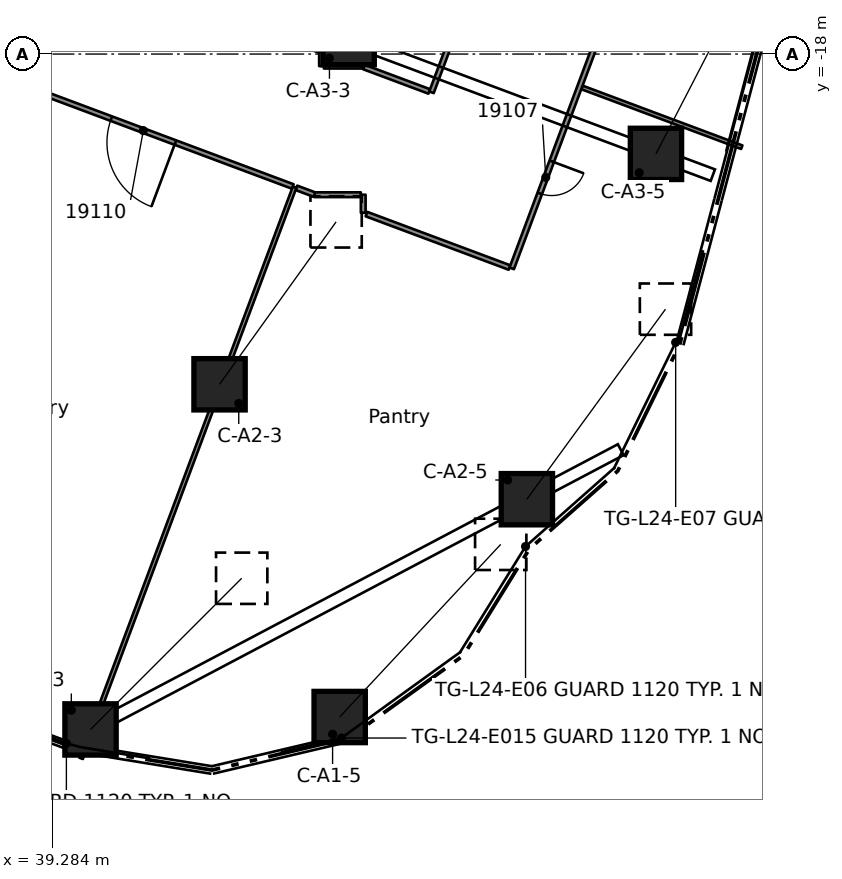
"""IFC4 building model, lengths in metres.
Left out: names, types, materials, properties, quantities, classifications, styles, units other than length and angle.
Written with IfcOpenShell. Run it as: python <this file> out.ifc"""

import sys

from ifc_helpers import new_model, si_unit, direction, frame, frame_2d, origin, origin_2d, place, context, subcontext, project, spatial, rectangle, extrude, element, fill, save


model = new_model("IFC4")
c1 = context("Model", 3, precision=1e-05, world=origin(), true_north=direction((0.0, 1.0)))
c2 = subcontext(c1, "Body", "Model", "MODEL_VIEW")
j1 = project(units=[si_unit("LENGTHUNIT", "METRE"), si_unit("PLANEANGLEUNIT", "RADIAN")], contexts=[c1])
p1 = place(None, origin())
s1 = spatial("IfcSite", under=j1, at=p1, CompositionType="ELEMENT")
p2 = place(p1, origin())
s2 = spatial("IfcBuilding", under=s1, at=p2, CompositionType="ELEMENT")
p3 = place(p2, frame((0.0, 0.0, 98.2)))
s3 = spatial("IfcBuildingStorey", under=s2, at=p3, CompositionType="ELEMENT", Elevation=98.2)
p4 = place(p3, frame((40.291, -35.771, 0.605), z_axis=(0.633459537703, 0.633459537703, 0.444362496376), x_axis=(-0.707106781187, 0.707106781187, 0.0)))
e1 = element("IfcColumn", 1, at=p4, inside=s3, PredefinedType="COLUMN", context=c2, shape_type="SweptSolid", body=[
    extrude(rectangle(XDim=1.35, YDim=1.35, at=origin_2d()), origin(), (0.0, 0.0, 1.0), 6.28),
])
p5 = place(p3, frame((46.847, -35.444, 0.617), z_axis=(0.623125024098, 0.667995482081, 0.406813520255), x_axis=(-0.731239489111, 0.682120817426, 0.0)))
e2 = element("IfcColumn", 2, at=p5, inside=s3, PredefinedType="COLUMN", context=c2, shape_type="SweptSolid", body=[
    extrude(rectangle(XDim=1.35, YDim=1.35, at=origin_2d()), origin(), (0.0, 0.0, 1.0), 6.801),
])
p6 = place(p3, frame((43.686, -26.689, 0.595), z_axis=(0.514338742712, 0.716602187148, 0.471101860663), x_axis=(-0.812401538839, 0.583098396235, 0.0)))
e3 = element("IfcColumn", 3, at=p6, inside=s3, PredefinedType="COLUMN", context=c2, shape_type="SweptSolid", body=[
    extrude(rectangle(XDim=1.35, YDim=1.35, at=origin_2d()), origin(), (0.0, 0.0, 1.0), 5.963),
])
p7 = place(p3, frame((51.773, -29.713, 0.616), z_axis=(0.537996520315, 0.737539868968, 0.40816012276), x_axis=(-0.80789955536, 0.589320208757, 0.0)))
e4 = element("IfcColumn", 4, at=p7, inside=s3, PredefinedType="COLUMN", context=c2, shape_type="SweptSolid", body=[
    extrude(rectangle(XDim=1.35, YDim=1.35, at=origin_2d()), origin(), (0.0, 0.0, 1.0), 6.781),
])
p8 = place(p3, frame((47.083, -17.604, 0.589), z_axis=(0.372353666966, 0.789462395389, 0.487956835143), x_axis=(-0.904446734387, 0.42658657346, 0.0)))
e5 = element("IfcColumn", 5, at=p8, inside=s3, PredefinedType="COLUMN", context=c2, shape_type="SweptSolid", body=[
    extrude(rectangle(XDim=1.35, YDim=1.35, at=origin_2d()), origin(), (0.0, 0.0, 1.0), 5.782),
])
p9 = place(p3, frame((55.17, -20.627, 0.612), z_axis=(0.416038371719, 0.805254732153, 0.422465252539), x_axis=(-0.888430364054, 0.459011424942, 0.0)))
e6 = element("IfcColumn", 6, at=p9, inside=s3, PredefinedType="COLUMN", context=c2, shape_type="SweptSolid", body=[
    extrude(rectangle(XDim=1.35, YDim=1.35, at=origin_2d()), origin(), (0.0, 0.0, 1.0), 6.572),
])
p10 = place(p3, frame((45.708, -21.52, 0.0), z_axis=(0.0, 0.0, 1.0), x_axis=(0.936445862151, -0.350812125305, 0.0)))
e7 = element("IfcWall", 7, at=p10, inside=s3, PredefinedType="PARTITIONING", context=c2, shape_type="SweptSolid", body=[
    extrude(rectangle(XDim=0.516, YDim=0.125, at=frame_2d((0.258, 0.0))), origin(), (0.0, 0.0, 1.0), 3.58),
])
p11 = place(p3, frame((45.614, -21.485, 0.0), z_axis=(0.0, 0.0, 1.0), x_axis=(-0.936670500211, 0.350211898761, 0.0)))
e8 = element("IfcWall", 8, at=p11, inside=s3, PredefinedType="PARTITIONING", context=c2, shape_type="SweptSolid", body=[
    extrude(rectangle(XDim=19.229, YDim=0.125, at=frame_2d((9.614, 0.0))), origin(), (0.0, 0.0, 1.0), 3.58),
])
p12 = place(p11, frame((15.8, 0.0, 0.0)))
e9 = element("IfcOpeningElement", 9, at=p12, cuts=e8, PredefinedType="OPENING", context=c2, shape_type="SweptSolid", body=[
    extrude(rectangle(XDim=1.8, YDim=2.1, at=frame_2d((0.9, 1.05))), frame((0.0, 0.073, 0.0), z_axis=(0.0, -1.0, 0.0), x_axis=(1.0, 0.0, 0.0)), (0.0, 0.0, 1.0), 0.145),
])
p13 = place(p11, frame((11.25, 0.0, 0.0)))
e10 = element("IfcOpeningElement", 10, at=p13, cuts=e8, PredefinedType="OPENING", context=c2, shape_type="SweptSolid", body=[
    extrude(rectangle(XDim=1.1, YDim=2.1, at=frame_2d((0.55, 1.05))), frame((0.0, 0.073, 0.0), z_axis=(0.0, -1.0, 0.0), x_axis=(1.0, 0.0, 0.0)), (0.0, 0.0, 1.0), 0.145),
])
p14 = place(p11, frame((3.3, 0.0, 0.0)))
e11 = element("IfcOpeningElement", 11, at=p14, cuts=e8, PredefinedType="OPENING", context=c2, shape_type="SweptSolid", body=[
    extrude(rectangle(XDim=1.8, YDim=2.1, at=frame_2d((0.9, 1.05))), frame((0.0, 0.073, 0.0), z_axis=(0.0, -1.0, 0.0), x_axis=(1.0, 0.0, 0.0)), (0.0, 0.0, 1.0), 0.145),
])
p15 = place(p3, frame((47.552, -22.211, 0.0), z_axis=(0.0, 0.0, 1.0), x_axis=(0.936775397806, -0.349931213334, 0.0)))
e12 = element("IfcWall", 12, at=p15, inside=s3, PredefinedType="PARTITIONING", context=c2, shape_type="SweptSolid", body=[
    extrude(rectangle(XDim=4.018, YDim=0.125, at=frame_2d((2.009, 0.0))), origin(), (0.0, 0.0, 1.0), 3.58),
])
p16 = place(p3, frame((47.485, -18.341, 0.0), z_axis=(0.0, 0.0, 1.0), x_axis=(0.936651330255, -0.350263166107, 0.0)))
e13 = element("IfcWall", 13, at=p16, inside=s3, PredefinedType="PARTITIONING", context=c2, shape_type="SweptSolid", body=[
    extrude(rectangle(XDim=1.835, YDim=0.125, at=frame_2d((0.917, 0.0))), origin(), (0.0, 0.0, 1.0), 3.58),
])
p17 = place(p3, frame((53.222, -18.878, 0.0), z_axis=(0.0, 0.0, 1.0), x_axis=(0.936641604778, -0.350289172254, 0.0)))
e14 = element("IfcWall", 14, at=p17, inside=s3, PredefinedType="PARTITIONING", context=c2, shape_type="SweptSolid", body=[
    extrude(rectangle(XDim=4.49, YDim=0.1, at=frame_2d((2.245, 0.0))), origin(), (0.0, 0.0, 1.0), 3.58),
])
p18 = place(p3, frame((46.191, -21.701, 0.0), z_axis=(0.0, 0.0, 1.0), x_axis=(1.0, 0.0, 0.0)))
e15 = element("IfcWall", 15, at=p18, inside=s3, PredefinedType="PARTITIONING", context=c2, shape_type="SweptSolid", body=[
    extrude(rectangle(XDim=1.213, YDim=0.125, at=frame_2d((0.606, 0.0))), origin(), (0.0, 0.0, 1.0), 3.58),
])
p19 = place(p3, frame((46.431, -18.318, 0.0), z_axis=(0.0, 0.0, 1.0), x_axis=(1.0, 0.0, 0.0)))
e16 = element("IfcWall", 16, at=p19, inside=s3, PredefinedType="PARTITIONING", context=c2, shape_type="SweptSolid", body=[
    extrude(rectangle(XDim=0.995, YDim=0.125, at=frame_2d((0.498, 0.0))), origin(), (0.0, 0.0, 1.0), 3.58),
])
p20 = place(p3, frame((54.954, -14.065, 0.0), z_axis=(0.0, 0.0, 1.0), x_axis=(-0.350167821349, -0.936686979141, 0.0)))
e17 = element("IfcWall", 17, at=p20, inside=s3, PredefinedType="PARTITIONING", context=c2, shape_type="SweptSolid", body=[
    extrude(rectangle(XDim=10.221, YDim=0.125, at=frame_2d((5.111, 0.0))), origin(), (0.0, 0.0, 1.0), 3.58),
])
p21 = place(p20, frame((7.215, 0.0, 0.0)))
e18 = element("IfcOpeningElement", 18, at=p21, cuts=e17, PredefinedType="OPENING", context=c2, shape_type="SweptSolid", body=[
    extrude(rectangle(XDim=0.9, YDim=2.1, at=frame_2d((0.45, 1.05))), frame((0.0, 0.073, 0.0), z_axis=(0.0, -1.0, 0.0), x_axis=(1.0, 0.0, 0.0)), (0.0, 0.0, 1.0), 0.145),
])
p22 = place(p3, frame((49.263, -19.006, 0.0), z_axis=(0.0, 0.0, 1.0), x_axis=(0.350363010059, 0.936613987287, 0.0)))
e19 = element("IfcWall", 19, at=p22, inside=s3, PredefinedType="PARTITIONING", context=c2, shape_type="SweptSolid", body=[
    extrude(rectangle(XDim=4.293, YDim=0.125, at=frame_2d((2.146, 0.0))), origin(), (0.0, 0.0, 1.0), 3.58),
])
p23 = place(p3, frame((40.042, -36.532, 0.0), z_axis=(0.0, 0.0, 1.0), x_axis=(0.350194472213, 0.936677015642, 0.0)))
e20 = element("IfcWall", 20, at=p23, inside=s3, PredefinedType="PARTITIONING", context=c2, shape_type="SweptSolid", body=[
    extrude(rectangle(XDim=16.045, YDim=0.1, at=frame_2d((8.022, 0.0))), origin(), (0.0, 0.0, 1.0), 3.58),
])
p24 = place(p3, frame((47.467, -22.178, 0.0), z_axis=(0.0, 0.0, 1.0), x_axis=(0.0, 1.0, 0.0)))
e21 = element("IfcWall", 21, at=p24, inside=s3, PredefinedType="PARTITIONING", context=c2, shape_type="SweptSolid", body=[
    extrude(rectangle(XDim=0.477, YDim=0.125, at=frame_2d((0.239, 0.0))), origin(), (0.0, 0.0, 1.0), 3.58),
])
p25 = place(p3, frame((46.369, -18.318, 0.0), z_axis=(0.0, 0.0, 1.0), x_axis=(0.0, 1.0, 0.0)))
e22 = element("IfcWall", 22, at=p25, inside=s3, PredefinedType="PARTITIONING", context=c2, shape_type="SweptSolid", body=[
    extrude(rectangle(XDim=0.394, YDim=0.125, at=frame_2d((0.197, 0.0))), origin(), (0.0, 0.0, 1.0), 3.58),
])
p26 = place(p21, origin())
e23 = element("IfcDoor", 23, at=p26, inside=s3, OperationType="SINGLE_SWING_RIGHT", PredefinedType="DOOR", context=c2, shape_type="SweptSolid", body=[
    extrude(rectangle(XDim=0.9, YDim=2.1, at=frame_2d((0.45, 1.05))), frame((0.0, 0.025, 0.0), z_axis=(0.0, -1.0, 0.0), x_axis=(1.0, 0.0, 0.0)), (0.0, 0.0, 1.0), 0.05),
])
fill(e18, e23)
p27 = place(p14, origin())
e24 = element("IfcDoor", 24, at=p27, inside=s3, OperationType="DOUBLE_DOOR_SINGLE_SWING", PredefinedType="DOOR", context=c2, shape_type="SweptSolid", body=[
    extrude(rectangle(XDim=1.8, YDim=2.1, at=frame_2d((0.9, 1.05))), frame((0.0, 0.025, 0.0), z_axis=(0.0, -1.0, 0.0), x_axis=(1.0, 0.0, 0.0)), (0.0, 0.0, 1.0), 0.05),
])
fill(e11, e24)
save(model, sys.argv[1])
